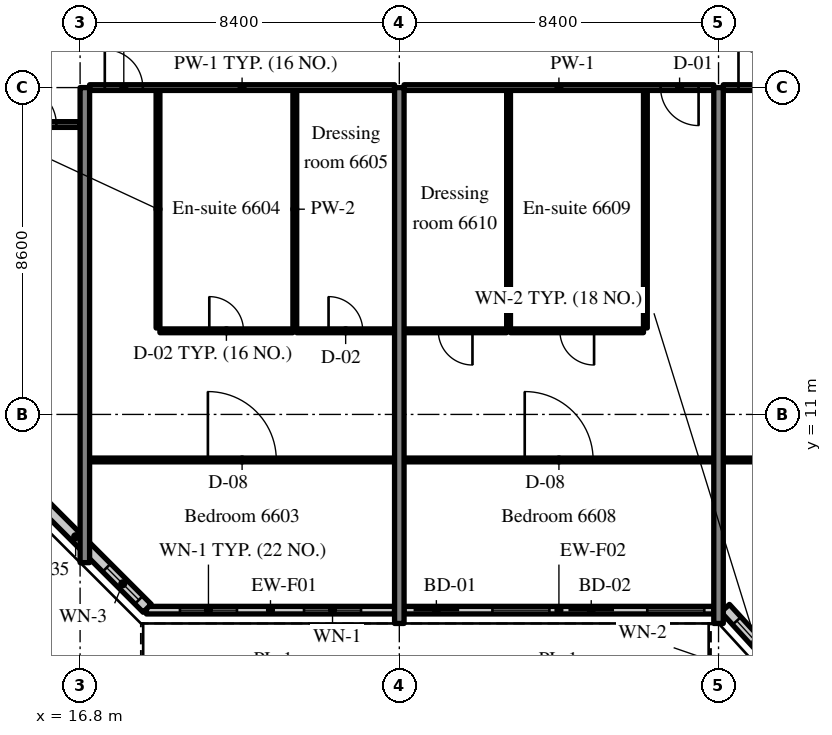
"""IFC4 building model, lengths in metres.
Left out: names, types, materials, properties, quantities, classifications, styles, units other than length and angle.
Written with IfcOpenShell. Run it as: python <this file> out.ifc"""

import sys

from ifc_helpers import new_model, si_unit, direction, frame, frame_2d, origin, place, context, subcontext, project, spatial, rectangle, extrude, source, transform, mapped, element, fill, save


model = new_model("IFC4")
c1 = context("Model", 3, precision=1e-05, world=origin(), true_north=direction((0.0, 1.0)))
c2 = subcontext(c1, "Body", "Model", "MODEL_VIEW")
j1 = project(units=[si_unit("LENGTHUNIT", "METRE"), si_unit("PLANEANGLEUNIT", "RADIAN")], contexts=[c1])
p1 = place(None, origin())
s1 = spatial("IfcSite", under=j1, at=p1, CompositionType="ELEMENT")
p2 = place(p1, origin())
s2 = spatial("IfcBuilding", under=s1, at=p2, CompositionType="ELEMENT")
p3 = place(p2, frame((0.0, 0.0, 277.7)))
s3 = spatial("IfcBuildingStorey", under=s2, at=p3, CompositionType="ELEMENT", Elevation=277.7)
m1 = source(origin(), c2, "Body", "SweptSolid", [
    extrude(rectangle(XDim=12.5, YDim=0.25, at=frame_2d((6.25, 0.0))), origin(), (0.0, 0.0, 1.0), 3.72),
])
p4 = place(p3, frame((16.925, 7.1, 0.0), z_axis=(0.0, 0.0, 1.0), x_axis=(0.0, 1.0, 0.0)))
e1 = element("IfcWall", 1, at=p4, inside=s3, PredefinedType="SHEAR", context=c2, shape_type="MappedRepresentation", body=[
    mapped(m1, transform((0.0, 0.0, 0.0), scale=1.0)),
])
m2 = source(origin(), c2, "Body", "SweptSolid", [
    extrude(rectangle(XDim=14.1, YDim=0.25, at=frame_2d((7.05, 0.0))), origin(), (0.0, 0.0, 1.0), 3.72),
])
for number, where, z_axis, x_axis in (
    (2, (25.2, 5.5, 0.0), (0.0, 0.0, 1.0), (0.0, 1.0, 0.0)),
    (3, (33.6, 5.5, 0.0), (0.0, 0.0, 1.0), (0.0, 1.0, 0.0)),
):
    element("IfcWall", number, at=place(p3, frame(where, z_axis=z_axis, x_axis=x_axis)), inside=s3, PredefinedType="SHEAR", context=c2, shape_type="MappedRepresentation", body=[
        mapped(m2, transform((0.0, 0.0, 0.0), scale=1.0)),
    ])
m3 = source(origin(), c2, "Body", "SweptSolid", [
    extrude(rectangle(XDim=6.53, YDim=0.2, at=frame_2d((3.265, 0.0))), origin(), (0.0, 0.0, 1.0), 3.17),
])
p5 = place(p3, frame((18.545, 5.85, 0.0), z_axis=(0.0, 0.0, 1.0), x_axis=(1.0, 0.0, 0.0)))
e4 = element("IfcWall", 4, at=p5, inside=s3, PredefinedType="SOLIDWALL", context=c2, shape_type="MappedRepresentation", body=[
    mapped(m3, transform((0.0, 0.0, 0.0), scale=1.0)),
])
m4 = source(origin(), c2, "Body", "SweptSolid", [
    extrude(rectangle(XDim=1.5, YDim=1.5, at=frame_2d((0.75, 0.75))), frame((0.0, 0.11, 0.0), z_axis=(0.0, -1.0, 0.0), x_axis=(1.0, 0.0, 0.0)), (0.0, 0.0, 1.0), 0.22),
])
p6 = place(p5, frame((0.883, 0.0, 0.9)))
e5 = element("IfcOpeningElement", 5, at=p6, cuts=e4, PredefinedType="OPENING", context=c2, shape_type="MappedRepresentation", body=[
    mapped(m4, transform((0.0, 0.0, 0.0), scale=1.0)),
])
p7 = place(p5, frame((4.147, 0.0, 0.9)))
e6 = element("IfcOpeningElement", 6, at=p7, cuts=e4, PredefinedType="OPENING", context=c2, shape_type="MappedRepresentation", body=[
    mapped(m4, transform((0.0, 0.0, 0.0), scale=1.0)),
])
m5 = source(origin(), c2, "Body", "SweptSolid", [
    extrude(rectangle(XDim=8.15, YDim=0.2, at=frame_2d((4.075, 0.0))), origin(), (0.0, 0.0, 1.0), 3.17),
])
p8 = place(p3, frame((25.325, 5.85, 0.0), z_axis=(0.0, 0.0, 1.0), x_axis=(1.0, 0.0, 0.0)))
e7 = element("IfcWall", 7, at=p8, inside=s3, PredefinedType="SOLIDWALL", context=c2, shape_type="MappedRepresentation", body=[
    mapped(m5, transform((0.0, 0.0, 0.0), scale=1.0)),
])
m6 = source(origin(), c2, "Body", "SweptSolid", [
    extrude(rectangle(XDim=1.2, YDim=2.4, at=frame_2d((0.6, 1.2))), frame((0.0, 0.11, 0.0), z_axis=(0.0, -1.0, 0.0), x_axis=(1.0, 0.0, 0.0)), (0.0, 0.0, 1.0), 0.22),
])
p9 = place(p8, frame((0.25, 0.0, 0.0)))
e8 = element("IfcOpeningElement", 8, at=p9, cuts=e7, PredefinedType="OPENING", context=c2, shape_type="MappedRepresentation", body=[
    mapped(m6, transform((0.0, 0.0, 0.0), scale=1.0)),
])
p10 = place(p8, frame((2.325, 0.0, 0.9)))
e9 = element("IfcOpeningElement", 9, at=p10, cuts=e7, PredefinedType="OPENING", context=c2, shape_type="MappedRepresentation", body=[
    mapped(m4, transform((0.0, 0.0, 0.0), scale=1.0)),
])
p11 = place(p8, frame((4.325, 0.0, 0.0)))
e10 = element("IfcOpeningElement", 10, at=p11, cuts=e7, PredefinedType="OPENING", context=c2, shape_type="MappedRepresentation", body=[
    mapped(m6, transform((0.0, 0.0, 0.0), scale=1.0)),
])
p12 = place(p8, frame((6.4, 0.0, 0.9)))
e11 = element("IfcOpeningElement", 11, at=p12, cuts=e7, PredefinedType="OPENING", context=c2, shape_type="MappedRepresentation", body=[
    mapped(m4, transform((0.0, 0.0, 0.0), scale=1.0)),
])
m7 = source(origin(), c2, "Body", "SweptSolid", [
    extrude(rectangle(XDim=2.398, YDim=0.3, at=frame_2d((1.199, 0.0))), origin(), (0.0, 0.0, 1.0), 3.72),
])
p13 = place(p3, frame((33.776, 5.9, 0.0), z_axis=(0.0, 0.0, 1.0), x_axis=(0.675374189419, -0.737475222815, 0.0)))
e12 = element("IfcWall", 12, at=p13, inside=s3, PredefinedType="SOLIDWALL", context=c2, shape_type="MappedRepresentation", body=[
    mapped(m7, transform((0.0, 0.0, 0.0), scale=1.0)),
])
m8 = source(origin(), c2, "Body", "SweptSolid", [
    extrude(rectangle(XDim=1.5, YDim=2.0, at=frame_2d((0.75, 1.0))), frame((0.0, 0.16, 0.0), z_axis=(0.0, -1.0, 0.0), x_axis=(1.0, 0.0, 0.0)), (0.0, 0.0, 1.0), 0.32),
])
p14 = place(p13, frame((0.449, 0.0, 0.9)))
e13 = element("IfcOpeningElement", 13, at=p14, cuts=e12, PredefinedType="OPENING", context=c2, shape_type="MappedRepresentation", body=[
    mapped(m8, transform((0.0, 0.0, 0.0), scale=1.0)),
])
m9 = source(origin(), c2, "Body", "SweptSolid", [
    extrude(rectangle(XDim=5.326, YDim=0.3, at=frame_2d((2.663, 0.0))), origin(), (0.0, 0.0, 1.0), 3.72),
])
p15 = place(p3, frame((14.8, 9.666, 0.0), z_axis=(0.0, 0.0, 1.0), x_axis=(0.707083859269, -0.707129702361, 0.0)))
e14 = element("IfcWall", 14, at=p15, inside=s3, PredefinedType="SOLIDWALL", context=c2, shape_type="MappedRepresentation", body=[
    mapped(m9, transform((0.0, 0.0, 0.0), scale=1.0)),
])
m10 = source(origin(), c2, "Body", "SweptSolid", [
    extrude(rectangle(XDim=1.2, YDim=1.5, at=frame_2d((0.6, 0.75))), frame((0.0, 0.16, 0.0), z_axis=(0.0, -1.0, 0.0), x_axis=(1.0, 0.0, 0.0)), (0.0, 0.0, 1.0), 0.32),
])
p16 = place(p15, frame((3.815, 0.0, 0.9)))
e15 = element("IfcOpeningElement", 15, at=p16, cuts=e14, PredefinedType="OPENING", context=c2, shape_type="MappedRepresentation", body=[
    mapped(m10, transform((0.0, 0.0, 0.0), scale=1.0)),
])
m11 = source(origin(), c2, "Body", "SweptSolid", [
    extrude(rectangle(XDim=6.25, YDim=0.1, at=frame_2d((3.125, 0.0))), origin(), (0.0, 0.0, 1.0), 3.72),
])
for number, where, z_axis, x_axis in (
    (16, (18.85, 13.275, 0.0), (0.0, 0.0, 1.0), (0.0, 1.0, 0.0)),
    (17, (22.45, 13.275, 0.0), (0.0, 0.0, 1.0), (0.0, 1.0, 0.0)),
):
    element("IfcWall", number, at=place(p3, frame(where, z_axis=z_axis, x_axis=x_axis)), inside=s3, PredefinedType="PARTITIONING", context=c2, shape_type="MappedRepresentation", body=[
        mapped(m11, transform((0.0, 0.0, 0.0), scale=1.0)),
    ])
m12 = source(origin(), c2, "Body", "SweptSolid", [
    extrude(rectangle(XDim=3.5, YDim=0.1, at=frame_2d((1.75, 0.0))), origin(), (0.0, 0.0, 1.0), 3.72),
])
p17 = place(p3, frame((18.9, 13.2, 0.0), z_axis=(0.0, 0.0, 1.0), x_axis=(1.0, 0.0, 0.0)))
e18 = element("IfcWall", 18, at=p17, inside=s3, PredefinedType="PARTITIONING", context=c2, shape_type="MappedRepresentation", body=[
    mapped(m12, transform((0.0, 0.0, 0.0), scale=1.0)),
])
m13 = source(origin(), c2, "Body", "SweptSolid", [
    extrude(rectangle(XDim=0.9, YDim=2.1, at=frame_2d((0.45, 1.05))), frame((0.0, 0.06, 0.0), z_axis=(0.0, -1.0, 0.0), x_axis=(1.0, 0.0, 0.0)), (0.0, 0.0, 1.0), 0.12),
])
p18 = place(p17, frame((1.3, 0.0, 0.0)))
e19 = element("IfcOpeningElement", 19, at=p18, cuts=e18, PredefinedType="OPENING", context=c2, shape_type="MappedRepresentation", body=[
    mapped(m13, transform((0.0, 0.0, 0.0), scale=1.0)),
])
m14 = source(origin(), c2, "Body", "SweptSolid", [
    extrude(rectangle(XDim=2.575, YDim=0.1, at=frame_2d((1.288, 0.0))), origin(), (0.0, 0.0, 1.0), 3.72),
])
p19 = place(p3, frame((22.5, 13.2, 0.0), z_axis=(0.0, 0.0, 1.0), x_axis=(1.0, 0.0, 0.0)))
e20 = element("IfcWall", 20, at=p19, inside=s3, PredefinedType="PARTITIONING", context=c2, shape_type="MappedRepresentation", body=[
    mapped(m14, transform((0.0, 0.0, 0.0), scale=1.0)),
])
p20 = place(p19, frame((0.838, 0.0, 0.0)))
e21 = element("IfcOpeningElement", 21, at=p20, cuts=e20, PredefinedType="OPENING", context=c2, shape_type="MappedRepresentation", body=[
    mapped(m13, transform((0.0, 0.0, 0.0), scale=1.0)),
])
m15 = source(origin(), c2, "Body", "SweptSolid", [
    extrude(rectangle(XDim=8.025, YDim=0.1, at=frame_2d((4.012, 0.0))), origin(), (0.0, 0.0, 1.0), 3.72),
])
p21 = place(p3, frame((17.05, 9.802, 0.0), z_axis=(0.0, 0.0, 1.0), x_axis=(1.0, 0.0, 0.0)))
e22 = element("IfcWall", 22, at=p21, inside=s3, PredefinedType="PARTITIONING", context=c2, shape_type="MappedRepresentation", body=[
    mapped(m15, transform((0.0, 0.0, 0.0), scale=1.0)),
])
m16 = source(origin(), c2, "Body", "SweptSolid", [
    extrude(rectangle(XDim=1.8, YDim=2.1, at=frame_2d((0.9, 1.05))), frame((0.0, 0.06, 0.0), z_axis=(0.0, -1.0, 0.0), x_axis=(1.0, 0.0, 0.0)), (0.0, 0.0, 1.0), 0.12),
])
p22 = place(p21, frame((3.113, 0.0, 0.0)))
e23 = element("IfcOpeningElement", 23, at=p22, cuts=e22, PredefinedType="OPENING", context=c2, shape_type="MappedRepresentation", body=[
    mapped(m16, transform((0.0, 0.0, 0.0), scale=1.0)),
])
m17 = source(origin(), c2, "Body", "SweptSolid", [
    extrude(rectangle(XDim=8.025, YDim=0.15, at=frame_2d((4.012, 0.0))), origin(), (0.0, 0.0, 1.0), 3.02),
])
p23 = place(p3, frame((17.05, 19.6, 0.0), z_axis=(0.0, 0.0, 1.0), x_axis=(1.0, 0.0, 0.0)))
e24 = element("IfcWall", 24, at=p23, inside=s3, PredefinedType="PARTITIONING", context=c2, shape_type="MappedRepresentation", body=[
    mapped(m17, transform((0.0, 0.0, 0.0), scale=1.0)),
])
m18 = source(origin(), c2, "Body", "SweptSolid", [
    extrude(rectangle(XDim=1.0, YDim=2.1, at=frame_2d((0.5, 1.05))), frame((0.0, 0.085, 0.0), z_axis=(0.0, -1.0, 0.0), x_axis=(1.0, 0.0, 0.0)), (0.0, 0.0, 1.0), 0.17),
])
p24 = place(p23, frame((0.4, 0.0, 0.0)))
e25 = element("IfcOpeningElement", 25, at=p24, cuts=e24, PredefinedType="OPENING", context=c2, shape_type="MappedRepresentation", body=[
    mapped(m18, transform((0.0, 0.0, 0.0), scale=1.0)),
])
for number, where, z_axis, x_axis in (
    (26, (31.675, 13.275, 0.0), (0.0, 0.0, 1.0), (0.0, 1.0, 0.0)),
    (27, (28.075, 13.275, 0.0), (0.0, 0.0, 1.0), (0.0, 1.0, 0.0)),
):
    element("IfcWall", number, at=place(p3, frame(where, z_axis=z_axis, x_axis=x_axis)), inside=s3, PredefinedType="PARTITIONING", context=c2, shape_type="MappedRepresentation", body=[
        mapped(m11, transform((0.0, 0.0, 0.0), scale=1.0)),
    ])
p25 = place(p3, frame((28.125, 13.2, 0.0), z_axis=(0.0, 0.0, 1.0), x_axis=(1.0, 0.0, 0.0)))
e28 = element("IfcWall", 28, at=p25, inside=s3, PredefinedType="PARTITIONING", context=c2, shape_type="MappedRepresentation", body=[
    mapped(m12, transform((0.0, 0.0, 0.0), scale=1.0)),
])
p26 = place(p25, frame((1.3, 0.0, 0.0)))
e29 = element("IfcOpeningElement", 29, at=p26, cuts=e28, PredefinedType="OPENING", context=c2, shape_type="MappedRepresentation", body=[
    mapped(m13, transform((0.0, 0.0, 0.0), scale=1.0)),
])
m19 = source(origin(), c2, "Body", "SweptSolid", [
    extrude(rectangle(XDim=2.7, YDim=0.1, at=frame_2d((1.35, 0.0))), origin(), (0.0, 0.0, 1.0), 3.72),
])
p27 = place(p3, frame((25.325, 13.2, 0.0), z_axis=(0.0, 0.0, 1.0), x_axis=(1.0, 0.0, 0.0)))
e30 = element("IfcWall", 30, at=p27, inside=s3, PredefinedType="PARTITIONING", context=c2, shape_type="MappedRepresentation", body=[
    mapped(m19, transform((0.0, 0.0, 0.0), scale=1.0)),
])
p28 = place(p27, frame((0.9, 0.0, 0.0)))
e31 = element("IfcOpeningElement", 31, at=p28, cuts=e30, PredefinedType="OPENING", context=c2, shape_type="MappedRepresentation", body=[
    mapped(m13, transform((0.0, 0.0, 0.0), scale=1.0)),
])
m20 = source(origin(), c2, "Body", "SweptSolid", [
    extrude(rectangle(XDim=8.15, YDim=0.1, at=frame_2d((4.075, 0.0))), origin(), (0.0, 0.0, 1.0), 3.72),
])
p29 = place(p3, frame((25.325, 9.802, 0.0), z_axis=(0.0, 0.0, 1.0), x_axis=(1.0, 0.0, 0.0)))
e32 = element("IfcWall", 32, at=p29, inside=s3, PredefinedType="PARTITIONING", context=c2, shape_type="MappedRepresentation", body=[
    mapped(m20, transform((0.0, 0.0, 0.0), scale=1.0)),
])
p30 = place(p29, frame((3.175, 0.0, 0.0)))
e33 = element("IfcOpeningElement", 33, at=p30, cuts=e32, PredefinedType="OPENING", context=c2, shape_type="MappedRepresentation", body=[
    mapped(m16, transform((0.0, 0.0, 0.0), scale=1.0)),
])
m21 = source(origin(), c2, "Body", "SweptSolid", [
    extrude(rectangle(XDim=8.15, YDim=0.15, at=frame_2d((4.075, 0.0))), origin(), (0.0, 0.0, 1.0), 3.02),
])
p31 = place(p3, frame((25.325, 19.6, 0.0), z_axis=(0.0, 0.0, 1.0), x_axis=(1.0, 0.0, 0.0)))
e34 = element("IfcWall", 34, at=p31, inside=s3, PredefinedType="PARTITIONING", context=c2, shape_type="MappedRepresentation", body=[
    mapped(m21, transform((0.0, 0.0, 0.0), scale=1.0)),
])
p32 = place(p31, frame((6.75, 0.0, 0.0)))
e35 = element("IfcOpeningElement", 35, at=p32, cuts=e34, PredefinedType="OPENING", context=c2, shape_type="MappedRepresentation", body=[
    mapped(m18, transform((0.0, 0.0, 0.0), scale=1.0)),
])
m22 = source(origin(), c2, "Body", "SweptSolid", [
    extrude(rectangle(XDim=8.15, YDim=0.1, at=frame_2d((4.075, 0.0))), origin(), (0.0, 0.0, 1.0), 3.72),
])
p33 = place(p3, frame((33.725, 9.802, 0.0), z_axis=(0.0, 0.0, 1.0), x_axis=(1.0, 0.0, 0.0)))
e36 = element("IfcWall", 36, at=p33, inside=s3, PredefinedType="PARTITIONING", context=c2, shape_type="MappedRepresentation", body=[
    mapped(m22, transform((0.0, 0.0, 0.0), scale=1.0)),
])
p34 = place(p33, frame((3.175, 0.0, 0.0)))
e37 = element("IfcOpeningElement", 37, at=p34, cuts=e36, PredefinedType="OPENING", context=c2, shape_type="MappedRepresentation", body=[
    mapped(m16, transform((0.0, 0.0, 0.0), scale=1.0)),
])
m23 = source(origin(), c2, "Body", "SweptSolid", [
    extrude(rectangle(XDim=8.15, YDim=0.15, at=frame_2d((4.075, 0.0))), origin(), (0.0, 0.0, 1.0), 3.02),
])
p35 = place(p3, frame((33.725, 19.6, 0.0), z_axis=(0.0, 0.0, 1.0), x_axis=(1.0, 0.0, 0.0)))
e38 = element("IfcWall", 38, at=p35, inside=s3, PredefinedType="PARTITIONING", context=c2, shape_type="MappedRepresentation", body=[
    mapped(m23, transform((0.0, 0.0, 0.0), scale=1.0)),
])
p36 = place(p35, frame((0.4, 0.0, 0.0)))
e39 = element("IfcOpeningElement", 39, at=p36, cuts=e38, PredefinedType="OPENING", context=c2, shape_type="MappedRepresentation", body=[
    mapped(m18, transform((0.0, 0.0, 0.0), scale=1.0)),
])
m24 = source(origin(), c2, "Body", "SweptSolid", [
    extrude(rectangle(XDim=1.9, YDim=0.15, at=frame_2d((0.95, 0.0))), origin(), (0.0, 0.0, 1.0), 3.02),
])
p37 = place(p3, frame((14.9, 18.628, 0.0), z_axis=(0.0, 0.0, 1.0), x_axis=(1.0, 0.0, 0.0)))
e40 = element("IfcWall", 40, at=p37, inside=s3, PredefinedType="PARTITIONING", context=c2, shape_type="MappedRepresentation", body=[
    mapped(m24, transform((0.0, 0.0, 0.0), scale=1.0)),
])
p38 = place(p37, frame((0.275, 0.0, 0.0)))
e41 = element("IfcOpeningElement", 41, at=p38, cuts=e40, PredefinedType="OPENING", context=c2, shape_type="MappedRepresentation", body=[
    mapped(m18, transform((0.0, 0.0, 0.0), scale=1.0)),
])
m25 = source(origin(), c2, "Body", "SweptSolid", [
    extrude(rectangle(XDim=1.5, YDim=1.5, at=frame_2d((0.75, 0.75))), frame((0.0, 0.03, 0.0), z_axis=(0.0, -1.0, 0.0), x_axis=(1.0, 0.0, 0.0)), (0.0, 0.0, 1.0), 0.06),
])
p39 = place(p6, origin())
e42 = element("IfcWindow", 42, at=p39, inside=s3, PartitioningType="SINGLE_PANEL", PredefinedType="WINDOW", context=c2, shape_type="MappedRepresentation", body=[
    mapped(m25, transform((0.0, 0.0, 0.0), scale=1.0)),
])
fill(e5, e42)
p40 = place(p7, origin())
e43 = element("IfcWindow", 43, at=p40, inside=s3, PartitioningType="SINGLE_PANEL", PredefinedType="WINDOW", context=c2, shape_type="MappedRepresentation", body=[
    mapped(m25, transform((0.0, 0.0, 0.0), scale=1.0)),
])
fill(e6, e43)
m26 = source(origin(), c2, "Body", "SweptSolid", [
    extrude(rectangle(XDim=1.2, YDim=2.4, at=frame_2d((0.6, 1.2))), frame((0.0, 0.025, 0.0), z_axis=(0.0, -1.0, 0.0), x_axis=(1.0, 0.0, 0.0)), (0.0, 0.0, 1.0), 0.05),
])
p41 = place(p9, origin())
e44 = element("IfcDoor", 44, at=p41, inside=s3, OperationType="SLIDING_TO_LEFT", PredefinedType="DOOR", context=c2, shape_type="MappedRepresentation", body=[
    mapped(m26, transform((0.0, 0.0, 0.0), scale=1.0)),
])
fill(e8, e44)
p42 = place(p10, origin())
e45 = element("IfcWindow", 45, at=p42, inside=s3, PartitioningType="SINGLE_PANEL", PredefinedType="WINDOW", context=c2, shape_type="MappedRepresentation", body=[
    mapped(m25, transform((0.0, 0.0, 0.0), scale=1.0)),
])
fill(e9, e45)
p43 = place(p11, origin())
e46 = element("IfcDoor", 46, at=p43, inside=s3, OperationType="SLIDING_TO_RIGHT", PredefinedType="DOOR", context=c2, shape_type="MappedRepresentation", body=[
    mapped(m26, transform((0.0, 0.0, 0.0), scale=1.0)),
])
fill(e10, e46)
p44 = place(p12, origin())
e47 = element("IfcWindow", 47, at=p44, inside=s3, PartitioningType="SINGLE_PANEL", PredefinedType="WINDOW", context=c2, shape_type="MappedRepresentation", body=[
    mapped(m25, transform((0.0, 0.0, 0.0), scale=1.0)),
])
fill(e11, e47)
m27 = source(origin(), c2, "Body", "SweptSolid", [
    extrude(rectangle(XDim=1.5, YDim=2.0, at=frame_2d((0.75, 1.0))), frame((0.0, 0.03, 0.0), z_axis=(0.0, -1.0, 0.0), x_axis=(1.0, 0.0, 0.0)), (0.0, 0.0, 1.0), 0.06),
])
p45 = place(p14, origin())
e48 = element("IfcWindow", 48, at=p45, inside=s3, PartitioningType="SINGLE_PANEL", PredefinedType="WINDOW", context=c2, shape_type="MappedRepresentation", body=[
    mapped(m27, transform((0.0, 0.0, 0.0), scale=1.0)),
])
fill(e13, e48)
m28 = source(origin(), c2, "Body", "SweptSolid", [
    extrude(rectangle(XDim=1.2, YDim=1.5, at=frame_2d((0.6, 0.75))), frame((0.0, 0.03, 0.0), z_axis=(0.0, -1.0, 0.0), x_axis=(1.0, 0.0, 0.0)), (0.0, 0.0, 1.0), 0.06),
])
p46 = place(p16, origin())
e49 = element("IfcWindow", 49, at=p46, inside=s3, PartitioningType="SINGLE_PANEL", PredefinedType="WINDOW", context=c2, shape_type="MappedRepresentation", body=[
    mapped(m28, transform((0.0, 0.0, 0.0), scale=1.0)),
])
fill(e15, e49)
m29 = source(origin(), c2, "Body", "SweptSolid", [
    extrude(rectangle(XDim=0.9, YDim=2.1, at=frame_2d((0.45, 1.05))), frame((0.0, 0.025, 0.0), z_axis=(0.0, -1.0, 0.0), x_axis=(1.0, 0.0, 0.0)), (0.0, 0.0, 1.0), 0.05),
])
p47 = place(p18, origin())
e50 = element("IfcDoor", 50, at=p47, inside=s3, OperationType="SINGLE_SWING_LEFT", PredefinedType="DOOR", context=c2, shape_type="MappedRepresentation", body=[
    mapped(m29, transform((0.0, 0.0, 0.0), scale=1.0)),
])
fill(e19, e50)
p48 = place(p20, origin())
e51 = element("IfcDoor", 51, at=p48, inside=s3, OperationType="SINGLE_SWING_LEFT", PredefinedType="DOOR", context=c2, shape_type="MappedRepresentation", body=[
    mapped(m29, transform((0.0, 0.0, 0.0), scale=1.0)),
])
fill(e21, e51)
m30 = source(origin(), c2, "Body", "SweptSolid", [
    extrude(rectangle(XDim=1.8, YDim=2.1, at=frame_2d((0.9, 1.05))), frame((0.0, 0.025, 0.0), z_axis=(0.0, -1.0, 0.0), x_axis=(1.0, 0.0, 0.0)), (0.0, 0.0, 1.0), 0.05),
])
p49 = place(p22, origin())
e52 = element("IfcDoor", 52, at=p49, inside=s3, OperationType="DOUBLE_DOOR_SINGLE_SWING", PredefinedType="DOOR", context=c2, shape_type="MappedRepresentation", body=[
    mapped(m30, transform((0.0, 0.0, 0.0), scale=1.0)),
])
fill(e23, e52)
m31 = source(origin(), c2, "Body", "SweptSolid", [
    extrude(rectangle(XDim=1.0, YDim=2.1, at=frame_2d((0.5, 1.05))), frame((0.0, 0.025, 0.0), z_axis=(0.0, -1.0, 0.0), x_axis=(1.0, 0.0, 0.0)), (0.0, 0.0, 1.0), 0.05),
])
p50 = place(p24, origin())
e53 = element("IfcDoor", 53, at=p50, inside=s3, OperationType="SINGLE_SWING_LEFT", PredefinedType="DOOR", context=c2, shape_type="MappedRepresentation", body=[
    mapped(m31, transform((0.0, 0.0, 0.0), scale=1.0)),
])
fill(e25, e53)
p51 = place(p26, origin())
e54 = element("IfcDoor", 54, at=p51, inside=s3, OperationType="SINGLE_SWING_RIGHT", PredefinedType="DOOR", context=c2, shape_type="MappedRepresentation", body=[
    mapped(m29, transform((0.0, 0.0, 0.0), scale=1.0)),
])
fill(e29, e54)
p52 = place(p28, origin())
e55 = element("IfcDoor", 55, at=p52, inside=s3, OperationType="SINGLE_SWING_RIGHT", PredefinedType="DOOR", context=c2, shape_type="MappedRepresentation", body=[
    mapped(m29, transform((0.0, 0.0, 0.0), scale=1.0)),
])
fill(e31, e55)
p53 = place(p30, origin())
e56 = element("IfcDoor", 56, at=p53, inside=s3, OperationType="DOUBLE_DOOR_SINGLE_SWING", PredefinedType="DOOR", context=c2, shape_type="MappedRepresentation", body=[
    mapped(m30, transform((0.0, 0.0, 0.0), scale=1.0)),
])
fill(e33, e56)
p54 = place(p32, origin())
e57 = element("IfcDoor", 57, at=p54, inside=s3, OperationType="SINGLE_SWING_RIGHT", PredefinedType="DOOR", context=c2, shape_type="MappedRepresentation", body=[
    mapped(m31, transform((0.0, 0.0, 0.0), scale=1.0)),
])
fill(e35, e57)
p55 = place(p36, origin())
e58 = element("IfcDoor", 58, at=p55, inside=s3, OperationType="SINGLE_SWING_LEFT", PredefinedType="DOOR", context=c2, shape_type="MappedRepresentation", body=[
    mapped(m31, transform((0.0, 0.0, 0.0), scale=1.0)),
])
fill(e39, e58)
p56 = place(p38, origin())
e59 = element("IfcDoor", 59, at=p56, inside=s3, OperationType="SINGLE_SWING_LEFT", PredefinedType="DOOR", context=c2, shape_type="MappedRepresentation", body=[
    mapped(m31, transform((0.0, 0.0, 0.0), scale=1.0)),
])
fill(e41, e59)
save(model, sys.argv[1])
